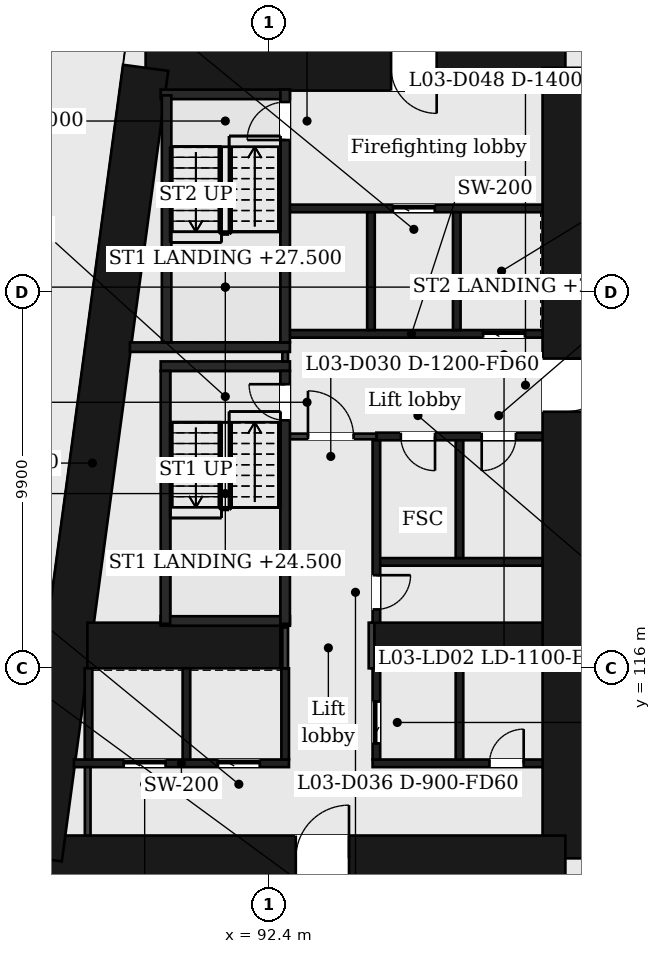
"""IFC4 building model, lengths in metres.
Left out: names, types, materials, properties, quantities, classifications, styles, units other than length and angle.
Written with IfcOpenShell. Run it as: python <this file> out.ifc"""

import sys

from ifc_helpers import new_model, si_unit, direction, frame, frame_2d, origin, place, context, subcontext, project, spatial, rectangle, extrude, element, fill, save


model = new_model("IFC4")
c1 = context("Model", 3, precision=1e-05, world=origin(), true_north=direction((0.0, 1.0)))
c2 = subcontext(c1, "Body", "Model", "MODEL_VIEW")
j1 = project(units=[si_unit("LENGTHUNIT", "METRE"), si_unit("PLANEANGLEUNIT", "RADIAN")], contexts=[c1])
p1 = place(None, origin())
s1 = spatial("IfcSite", under=j1, at=p1, CompositionType="ELEMENT")
p2 = place(p1, origin())
s2 = spatial("IfcBuilding", under=s1, at=p2, CompositionType="ELEMENT")
p3 = place(p2, frame((0.0, 0.0, 23.0)))
s3 = spatial("IfcBuildingStorey", under=s2, at=p3, CompositionType="ELEMENT", Elevation=23.0)
p4 = place(p3, frame((89.156, 131.8, 0.0), z_axis=(0.0, 0.0, 1.0), x_axis=(1.0, 0.0, 0.0)))
e1 = element("IfcWall", 1, at=p4, inside=s3, PredefinedType="SHEAR", context=c2, shape_type="SweptSolid", body=[
    extrude(rectangle(XDim=11.044, YDim=1.2, at=frame_2d((5.522, 0.0))), origin(), (0.0, 0.0, 1.0), 6.0),
])
p5 = place(p4, frame((6.458, 0.0, 0.0)))
e2 = element("IfcOpeningElement", 2, at=p5, cuts=e1, PredefinedType="OPENING", context=c2, shape_type="SweptSolid", body=[
    extrude(rectangle(XDim=1.2, YDim=2.1, at=frame_2d((0.6, 1.05))), frame((0.0, 0.61, 0.0), z_axis=(0.0, -1.0, 0.0), x_axis=(1.0, 0.0, 0.0)), (0.0, 0.0, 1.0), 1.22),
])
p6 = place(p3, frame((100.2, 131.8, 0.0), z_axis=(0.0, 0.0, 1.0), x_axis=(0.0, -1.0, 0.0)))
e3 = element("IfcWall", 3, at=p6, inside=s3, PredefinedType="SHEAR", context=c2, shape_type="SweptSolid", body=[
    extrude(rectangle(XDim=20.8, YDim=1.2, at=frame_2d((10.4, 0.0))), origin(), (0.0, 0.0, 1.0), 6.0),
])
p7 = place(p6, frame((7.65, 0.0, 0.0)))
e4 = element("IfcOpeningElement", 4, at=p7, cuts=e3, PredefinedType="OPENING", context=c2, shape_type="SweptSolid", body=[
    extrude(rectangle(XDim=1.4, YDim=2.1, at=frame_2d((0.7, 1.05))), frame((0.0, 0.61, 0.0), z_axis=(0.0, -1.0, 0.0), x_axis=(1.0, 0.0, 0.0)), (0.0, 0.0, 1.0), 1.22),
])
p8 = place(p3, frame((100.2, 111.0, 0.0), z_axis=(0.0, 0.0, 1.0), x_axis=(-1.0, 0.0, 0.0)))
e5 = element("IfcWall", 5, at=p8, inside=s3, PredefinedType="SHEAR", context=c2, shape_type="SweptSolid", body=[
    extrude(rectangle(XDim=13.844, YDim=1.2, at=frame_2d((6.922, 0.0))), origin(), (0.0, 0.0, 1.0), 6.0),
])
p9 = place(p8, frame((5.694, 0.0, 0.0)))
e6 = element("IfcOpeningElement", 6, at=p9, cuts=e5, PredefinedType="OPENING", context=c2, shape_type="SweptSolid", body=[
    extrude(rectangle(XDim=1.4, YDim=2.1, at=frame_2d((0.7, 1.05))), frame((0.0, 0.61, 0.0), z_axis=(0.0, -1.0, 0.0), x_axis=(1.0, 0.0, 0.0)), (0.0, 0.0, 1.0), 1.22),
])
p10 = place(p3, frame((86.355, 111.0, 0.0), z_axis=(0.0, 0.0, 1.0), x_axis=(0.133413989637, 0.99106039542, 0.0)))
e7 = element("IfcWall", 7, at=p10, inside=s3, PredefinedType="SHEAR", context=c2, shape_type="SweptSolid", body=[
    extrude(rectangle(XDim=20.988, YDim=1.2, at=frame_2d((10.494, 0.0))), origin(), (0.0, 0.0, 1.0), 6.0),
])
p11 = place(p3, frame((87.623, 116.6, 0.0), z_axis=(0.0, 0.0, 1.0), x_axis=(1.0, 0.0, 0.0)))
e8 = element("IfcWall", 8, at=p11, inside=s3, PredefinedType="SHEAR", context=c2, shape_type="SweptSolid", body=[
    extrude(rectangle(XDim=5.077, YDim=1.2, at=frame_2d((2.539, 0.0))), origin(), (0.0, 0.0, 1.0), 6.0),
])
p12 = place(p3, frame((95.1, 116.6, 0.0), z_axis=(0.0, 0.0, 1.0), x_axis=(1.0, 0.0, 0.0)))
e9 = element("IfcWall", 9, at=p12, inside=s3, PredefinedType="SHEAR", context=c2, shape_type="SweptSolid", body=[
    extrude(rectangle(XDim=4.5, YDim=1.2, at=frame_2d((2.25, 0.0))), origin(), (0.0, 0.0, 1.0), 6.0),
])
p13 = place(p3, frame((87.267, 113.5, 0.0), z_axis=(0.0, 0.0, 1.0), x_axis=(1.0, 0.0, 0.0)))
e10 = element("IfcWall", 10, at=p13, inside=s3, PredefinedType="PARTITIONING", context=c2, shape_type="SweptSolid", body=[
    extrude(rectangle(XDim=5.66, YDim=0.2, at=frame_2d((2.83, 0.0))), origin(), (0.0, 0.0, 1.0), 5.5),
])
p14 = place(p13, frame((1.312, 0.0, 0.0)))
e11 = element("IfcOpeningElement", 11, at=p14, cuts=e10, PredefinedType="OPENING", context=c2, shape_type="SweptSolid", body=[
    extrude(rectangle(XDim=1.1, YDim=2.1, at=frame_2d((0.55, 1.05))), frame((0.0, 0.11, 0.0), z_axis=(0.0, -1.0, 0.0), x_axis=(1.0, 0.0, 0.0)), (0.0, 0.0, 1.0), 0.22),
])
p15 = place(p13, frame((3.791, 0.0, 0.0)))
e12 = element("IfcOpeningElement", 12, at=p15, cuts=e10, PredefinedType="OPENING", context=c2, shape_type="SweptSolid", body=[
    extrude(rectangle(XDim=1.1, YDim=2.1, at=frame_2d((0.55, 1.05))), frame((0.0, 0.11, 0.0), z_axis=(0.0, -1.0, 0.0), x_axis=(1.0, 0.0, 0.0)), (0.0, 0.0, 1.0), 0.22),
])
p16 = place(p3, frame((95.127, 113.5, 0.0), z_axis=(0.0, 0.0, 1.0), x_axis=(1.0, 0.0, 0.0)))
e13 = element("IfcWall", 13, at=p16, inside=s3, PredefinedType="PARTITIONING", context=c2, shape_type="SweptSolid", body=[
    extrude(rectangle(XDim=4.473, YDim=0.2, at=frame_2d((2.237, 0.0))), origin(), (0.0, 0.0, 1.0), 5.5),
])
p17 = place(p16, frame((3.076, 0.0, 0.0)))
e14 = element("IfcOpeningElement", 14, at=p17, cuts=e13, PredefinedType="OPENING", context=c2, shape_type="SweptSolid", body=[
    extrude(rectangle(XDim=0.9, YDim=2.1, at=frame_2d((0.45, 1.05))), frame((0.0, 0.11, 0.0), z_axis=(0.0, -1.0, 0.0), x_axis=(1.0, 0.0, 0.0)), (0.0, 0.0, 1.0), 0.22),
])
p18 = place(p3, frame((89.552, 117.245, 0.0), z_axis=(0.0, 0.0, 1.0), x_axis=(1.0, 0.0, 0.0)))
e15 = element("IfcWall", 15, at=p18, inside=s3, PredefinedType="PARTITIONING", context=c2, shape_type="SweptSolid", body=[
    extrude(rectangle(XDim=3.4, YDim=0.25, at=frame_2d((1.7, 0.0))), origin(), (0.0, 0.0, 1.0), 5.5),
])
p19 = place(p3, frame((95.227, 118.8, 0.0), z_axis=(0.0, 0.0, 1.0), x_axis=(1.0, 0.0, 0.0)))
e16 = element("IfcWall", 16, at=p19, inside=s3, PredefinedType="PARTITIONING", context=c2, shape_type="SweptSolid", body=[
    extrude(rectangle(XDim=4.373, YDim=0.2, at=frame_2d((2.187, 0.0))), origin(), (0.0, 0.0, 1.0), 5.5),
])
p20 = place(p3, frame((95.227, 122.1, 0.0), z_axis=(0.0, 0.0, 1.0), x_axis=(1.0, 0.0, 0.0)))
e17 = element("IfcWall", 17, at=p20, inside=s3, PredefinedType="PARTITIONING", context=c2, shape_type="SweptSolid", body=[
    extrude(rectangle(XDim=4.373, YDim=0.2, at=frame_2d((2.187, 0.0))), origin(), (0.0, 0.0, 1.0), 5.5),
])
p21 = place(p20, frame((0.643, 0.0, 0.0)))
e18 = element("IfcOpeningElement", 18, at=p21, cuts=e17, PredefinedType="OPENING", context=c2, shape_type="SweptSolid", body=[
    extrude(rectangle(XDim=0.9, YDim=2.1, at=frame_2d((0.45, 1.05))), frame((0.0, 0.11, 0.0), z_axis=(0.0, -1.0, 0.0), x_axis=(1.0, 0.0, 0.0)), (0.0, 0.0, 1.0), 0.22),
])
p22 = place(p20, frame((2.771, 0.0, 0.0)))
e19 = element("IfcOpeningElement", 19, at=p22, cuts=e17, PredefinedType="OPENING", context=c2, shape_type="SweptSolid", body=[
    extrude(rectangle(XDim=0.9, YDim=2.1, at=frame_2d((0.45, 1.05))), frame((0.0, 0.11, 0.0), z_axis=(0.0, -1.0, 0.0), x_axis=(1.0, 0.0, 0.0)), (0.0, 0.0, 1.0), 0.22),
])
p23 = place(p3, frame((92.827, 122.1, 0.0), z_axis=(0.0, 0.0, 1.0), x_axis=(1.0, 0.0, 0.0)))
e20 = element("IfcWall", 20, at=p23, inside=s3, PredefinedType="PARTITIONING", context=c2, shape_type="SweptSolid", body=[
    extrude(rectangle(XDim=2.4, YDim=0.15, at=frame_2d((1.2, 0.0))), origin(), (0.0, 0.0, 1.0), 5.5),
])
p24 = place(p23, frame((0.6, 0.0, 0.0)))
e21 = element("IfcOpeningElement", 21, at=p24, cuts=e20, PredefinedType="OPENING", context=c2, shape_type="SweptSolid", body=[
    extrude(rectangle(XDim=1.2, YDim=2.1, at=frame_2d((0.6, 1.05))), frame((0.0, 0.085, 0.0), z_axis=(0.0, -1.0, 0.0), x_axis=(1.0, 0.0, 0.0)), (0.0, 0.0, 1.0), 0.17),
])
p25 = place(p3, frame((89.552, 123.95, 0.0), z_axis=(0.0, 0.0, 1.0), x_axis=(1.0, 0.0, 0.0)))
e22 = element("IfcWall", 22, at=p25, inside=s3, PredefinedType="PARTITIONING", context=c2, shape_type="SweptSolid", body=[
    extrude(rectangle(XDim=3.4, YDim=0.25, at=frame_2d((1.7, 0.0))), origin(), (0.0, 0.0, 1.0), 5.5),
])
p26 = place(p3, frame((88.741, 124.45, 0.0), z_axis=(0.0, 0.0, 1.0), x_axis=(1.0, 0.0, 0.0)))
e23 = element("IfcWall", 23, at=p26, inside=s3, PredefinedType="PARTITIONING", context=c2, shape_type="SweptSolid", body=[
    extrude(rectangle(XDim=4.21, YDim=0.25, at=frame_2d((2.105, 0.0))), origin(), (0.0, 0.0, 1.0), 5.5),
])
p27 = place(p3, frame((92.702, 124.8, 0.0), z_axis=(0.0, 0.0, 1.0), x_axis=(1.0, 0.0, 0.0)))
e24 = element("IfcWall", 24, at=p27, inside=s3, PredefinedType="PARTITIONING", context=c2, shape_type="SweptSolid", body=[
    extrude(rectangle(XDim=6.898, YDim=0.2, at=frame_2d((3.449, 0.0))), origin(), (0.0, 0.0, 1.0), 5.5),
])
p28 = place(p27, frame((5.334, 0.0, 0.0)))
e25 = element("IfcOpeningElement", 25, at=p28, cuts=e24, PredefinedType="OPENING", context=c2, shape_type="SweptSolid", body=[
    extrude(rectangle(XDim=1.1, YDim=2.1, at=frame_2d((0.55, 1.05))), frame((0.0, 0.11, 0.0), z_axis=(0.0, -1.0, 0.0), x_axis=(1.0, 0.0, 0.0)), (0.0, 0.0, 1.0), 0.22),
])
p29 = place(p3, frame((92.827, 128.1, 0.0), z_axis=(0.0, 0.0, 1.0), x_axis=(1.0, 0.0, 0.0)))
e26 = element("IfcWall", 26, at=p29, inside=s3, PredefinedType="PARTITIONING", context=c2, shape_type="SweptSolid", body=[
    extrude(rectangle(XDim=6.773, YDim=0.2, at=frame_2d((3.387, 0.0))), origin(), (0.0, 0.0, 1.0), 5.5),
])
p30 = place(p29, frame((2.836, 0.0, 0.0)))
e27 = element("IfcOpeningElement", 27, at=p30, cuts=e26, PredefinedType="OPENING", context=c2, shape_type="SweptSolid", body=[
    extrude(rectangle(XDim=1.1, YDim=2.1, at=frame_2d((0.55, 1.05))), frame((0.0, 0.11, 0.0), z_axis=(0.0, -1.0, 0.0), x_axis=(1.0, 0.0, 0.0)), (0.0, 0.0, 1.0), 0.22),
])
p31 = place(p3, frame((89.552, 131.101, 0.0), z_axis=(0.0, 0.0, 1.0), x_axis=(1.0, 0.0, 0.0)))
e28 = element("IfcWall", 28, at=p31, inside=s3, PredefinedType="PARTITIONING", context=c2, shape_type="SweptSolid", body=[
    extrude(rectangle(XDim=3.4, YDim=0.25, at=frame_2d((1.7, 0.0))), origin(), (0.0, 0.0, 1.0), 5.5),
])
p32 = place(p3, frame((87.653, 113.6, 0.0), z_axis=(0.0, 0.0, 1.0), x_axis=(0.0, 1.0, 0.0)))
e29 = element("IfcWall", 29, at=p32, inside=s3, PredefinedType="PARTITIONING", context=c2, shape_type="SweptSolid", body=[
    extrude(rectangle(XDim=2.4, YDim=0.2, at=frame_2d((1.2, 0.0))), origin(), (0.0, 0.0, 1.0), 5.5),
])
p33 = place(p3, frame((87.631, 111.6, 0.0), z_axis=(0.0, 0.0, 1.0), x_axis=(0.0, 1.0, 0.0)))
e30 = element("IfcWall", 30, at=p33, inside=s3, PredefinedType="PARTITIONING", context=c2, shape_type="SweptSolid", body=[
    extrude(rectangle(XDim=1.8, YDim=0.15, at=frame_2d((0.9, 0.0))), origin(), (0.0, 0.0, 1.0), 5.5),
])
p34 = place(p3, frame((89.677, 117.17, 0.0), z_axis=(0.0, 0.0, 1.0), x_axis=(0.0, 1.0, 0.0)))
e31 = element("IfcWall", 31, at=p34, inside=s3, PredefinedType="PARTITIONING", context=c2, shape_type="SweptSolid", body=[
    extrude(rectangle(XDim=6.655, YDim=0.25, at=frame_2d((3.328, 0.0))), origin(), (0.0, 0.0, 1.0), 5.5),
])
p35 = place(p3, frame((89.707, 124.575, 0.0), z_axis=(0.0, 0.0, 1.0), x_axis=(0.0, 1.0, 0.0)))
e32 = element("IfcWall", 32, at=p35, inside=s3, PredefinedType="PARTITIONING", context=c2, shape_type="SweptSolid", body=[
    extrude(rectangle(XDim=6.5, YDim=0.25, at=frame_2d((3.25, 0.0))), origin(), (0.0, 0.0, 1.0), 5.5),
])
for number, where, z_axis, x_axis in (
    (33, (90.229, 113.6, 0.0), (0.0, 0.0, 1.0), (0.0, 1.0, 0.0)),
    (34, (92.827, 113.6, 0.0), (0.0, 0.0, 1.0), (0.0, 1.0, 0.0)),
):
    element("IfcWall", number, at=place(p3, frame(where, z_axis=z_axis, x_axis=x_axis)), inside=s3, PredefinedType="PARTITIONING", context=c2, shape_type="SweptSolid", body=[
        extrude(rectangle(XDim=2.4, YDim=0.2, at=frame_2d((1.2, 0.0))), origin(), (0.0, 0.0, 1.0), 5.5),
    ])
p36 = place(p3, frame((92.827, 116.0, 0.0), z_axis=(0.0, 0.0, 1.0), x_axis=(0.0, 1.0, 0.0)))
e35 = element("IfcWall", 35, at=p36, inside=s3, PredefinedType="PARTITIONING", context=c2, shape_type="SweptSolid", body=[
    extrude(rectangle(XDim=1.075, YDim=0.15, at=frame_2d((0.538, 0.0))), origin(), (0.0, 0.0, 1.0), 5.5),
])
p37 = place(p3, frame((92.827, 124.075, 0.0), z_axis=(0.0, 0.0, 1.0), x_axis=(0.0, 1.0, 0.0)))
e36 = element("IfcWall", 36, at=p37, inside=s3, PredefinedType="PARTITIONING", context=c2, shape_type="SweptSolid", body=[
    extrude(rectangle(XDim=0.25, YDim=0.15, at=frame_2d((0.125, 0.0))), origin(), (0.0, 0.0, 1.0), 5.5),
])
p38 = place(p3, frame((92.827, 117.17, 0.0), z_axis=(0.0, 0.0, 1.0), x_axis=(0.0, 1.0, 0.0)))
e37 = element("IfcWall", 37, at=p38, inside=s3, PredefinedType="PARTITIONING", context=c2, shape_type="SweptSolid", body=[
    extrude(rectangle(XDim=6.655, YDim=0.25, at=frame_2d((3.328, 0.0))), origin(), (0.0, 0.0, 1.0), 5.5),
])
p39 = place(p38, frame((5.355, 0.0, 0.0)))
e38 = element("IfcOpeningElement", 38, at=p39, cuts=e37, PredefinedType="OPENING", context=c2, shape_type="SweptSolid", body=[
    extrude(rectangle(XDim=0.95, YDim=2.1, at=frame_2d((0.475, 1.05))), frame((0.0, 0.135, 0.0), z_axis=(0.0, -1.0, 0.0), x_axis=(1.0, 0.0, 0.0)), (0.0, 0.0, 1.0), 0.27),
])
p40 = place(p3, frame((92.827, 124.575, 0.0), z_axis=(0.0, 0.0, 1.0), x_axis=(0.0, 1.0, 0.0)))
e39 = element("IfcWall", 39, at=p40, inside=s3, PredefinedType="PARTITIONING", context=c2, shape_type="SweptSolid", body=[
    extrude(rectangle(XDim=6.655, YDim=0.25, at=frame_2d((3.328, 0.0))), origin(), (0.0, 0.0, 1.0), 5.5),
])
p41 = place(p40, frame((5.325, 0.0, 0.0)))
e40 = element("IfcOpeningElement", 40, at=p41, cuts=e39, PredefinedType="OPENING", context=c2, shape_type="SweptSolid", body=[
    extrude(rectangle(XDim=1.0, YDim=2.1, at=frame_2d((0.5, 1.05))), frame((0.0, 0.135, 0.0), z_axis=(0.0, -1.0, 0.0), x_axis=(1.0, 0.0, 0.0)), (0.0, 0.0, 1.0), 0.27),
])
p42 = place(p3, frame((95.085, 124.9, 0.0), z_axis=(0.0, 0.0, 1.0), x_axis=(0.0, 1.0, 0.0)))
e41 = element("IfcWall", 41, at=p42, inside=s3, PredefinedType="PARTITIONING", context=c2, shape_type="SweptSolid", body=[
    extrude(rectangle(XDim=3.1, YDim=0.2, at=frame_2d((1.55, 0.0))), origin(), (0.0, 0.0, 1.0), 5.5),
])
p43 = place(p3, frame((95.1, 116.0, 0.0), z_axis=(0.0, 0.0, 1.0), x_axis=(0.0, 1.0, 0.0)))
e42 = element("IfcWall", 42, at=p43, inside=s3, PredefinedType="PARTITIONING", context=c2, shape_type="SweptSolid", body=[
    extrude(rectangle(XDim=1.2, YDim=0.15, at=frame_2d((0.6, 0.0))), origin(), (0.0, 0.0, 1.0), 5.5),
])
p44 = place(p3, frame((95.227, 113.6, 0.0), z_axis=(0.0, 0.0, 1.0), x_axis=(0.0, 1.0, 0.0)))
e43 = element("IfcWall", 43, at=p44, inside=s3, PredefinedType="PARTITIONING", context=c2, shape_type="SweptSolid", body=[
    extrude(rectangle(XDim=2.4, YDim=0.2, at=frame_2d((1.2, 0.0))), origin(), (0.0, 0.0, 1.0), 5.5),
])
p45 = place(p44, frame((0.425, 0.0, 0.0)))
e44 = element("IfcOpeningElement", 44, at=p45, cuts=e43, PredefinedType="OPENING", context=c2, shape_type="SweptSolid", body=[
    extrude(rectangle(XDim=1.1, YDim=2.1, at=frame_2d((0.55, 1.05))), frame((0.0, 0.11, 0.0), z_axis=(0.0, -1.0, 0.0), x_axis=(1.0, 0.0, 0.0)), (0.0, 0.0, 1.0), 0.22),
])
p46 = place(p3, frame((95.227, 117.2, 0.0), z_axis=(0.0, 0.0, 1.0), x_axis=(0.0, 1.0, 0.0)))
e45 = element("IfcWall", 45, at=p46, inside=s3, PredefinedType="PARTITIONING", context=c2, shape_type="SweptSolid", body=[
    extrude(rectangle(XDim=4.8, YDim=0.2, at=frame_2d((2.4, 0.0))), origin(), (0.0, 0.0, 1.0), 5.5),
])
p47 = place(p46, frame((0.35, 0.0, 0.0)))
e46 = element("IfcOpeningElement", 46, at=p47, cuts=e45, PredefinedType="OPENING", context=c2, shape_type="SweptSolid", body=[
    extrude(rectangle(XDim=0.9, YDim=2.1, at=frame_2d((0.45, 1.05))), frame((0.0, 0.11, 0.0), z_axis=(0.0, -1.0, 0.0), x_axis=(1.0, 0.0, 0.0)), (0.0, 0.0, 1.0), 0.22),
])
p48 = place(p3, frame((97.342, 124.9, 0.0), z_axis=(0.0, 0.0, 1.0), x_axis=(0.0, 1.0, 0.0)))
e47 = element("IfcWall", 47, at=p48, inside=s3, PredefinedType="PARTITIONING", context=c2, shape_type="SweptSolid", body=[
    extrude(rectangle(XDim=3.1, YDim=0.2, at=frame_2d((1.55, 0.0))), origin(), (0.0, 0.0, 1.0), 5.5),
])
p49 = place(p3, frame((97.414, 113.6, 0.0), z_axis=(0.0, 0.0, 1.0), x_axis=(0.0, 1.0, 0.0)))
e48 = element("IfcWall", 48, at=p49, inside=s3, PredefinedType="PARTITIONING", context=c2, shape_type="SweptSolid", body=[
    extrude(rectangle(XDim=2.4, YDim=0.2, at=frame_2d((1.2, 0.0))), origin(), (0.0, 0.0, 1.0), 5.5),
])
p50 = place(p3, frame((97.414, 118.9, 0.0), z_axis=(0.0, 0.0, 1.0), x_axis=(0.0, 1.0, 0.0)))
e49 = element("IfcWall", 49, at=p50, inside=s3, PredefinedType="PARTITIONING", context=c2, shape_type="SweptSolid", body=[
    extrude(rectangle(XDim=3.1, YDim=0.2, at=frame_2d((1.55, 0.0))), origin(), (0.0, 0.0, 1.0), 5.5),
])
p51 = place(p24, origin())
e50 = element("IfcDoor", 50, at=p51, inside=s3, OperationType="SINGLE_SWING_LEFT", PredefinedType="DOOR", context=c2, shape_type="SweptSolid", body=[
    extrude(rectangle(XDim=1.2, YDim=2.1, at=frame_2d((0.6, 1.05))), frame((0.0, 0.025, 0.0), z_axis=(0.0, -1.0, 0.0), x_axis=(1.0, 0.0, 0.0)), (0.0, 0.0, 1.0), 0.05),
])
fill(e21, e50)
p52 = place(p30, origin())
e51 = element("IfcDoor", 51, at=p52, inside=s3, OperationType="SLIDING_TO_LEFT", PredefinedType="DOOR", context=c2, shape_type="SweptSolid", body=[
    extrude(rectangle(XDim=1.1, YDim=2.1, at=frame_2d((0.55, 1.05))), frame((0.0, 0.025, 0.0), z_axis=(0.0, -1.0, 0.0), x_axis=(1.0, 0.0, 0.0)), (0.0, 0.0, 1.0), 0.05),
])
fill(e27, e51)
p53 = place(p28, origin())
e52 = element("IfcDoor", 52, at=p53, inside=s3, OperationType="SLIDING_TO_LEFT", PredefinedType="DOOR", context=c2, shape_type="SweptSolid", body=[
    extrude(rectangle(XDim=1.1, YDim=2.1, at=frame_2d((0.55, 1.05))), frame((0.0, 0.025, 0.0), z_axis=(0.0, -1.0, 0.0), x_axis=(1.0, 0.0, 0.0)), (0.0, 0.0, 1.0), 0.05),
])
fill(e25, e52)
p54 = place(p21, origin())
e53 = element("IfcDoor", 53, at=p54, inside=s3, OperationType="SINGLE_SWING_RIGHT", PredefinedType="DOOR", context=c2, shape_type="SweptSolid", body=[
    extrude(rectangle(XDim=0.9, YDim=2.1, at=frame_2d((0.45, 1.05))), frame((0.0, 0.025, 0.0), z_axis=(0.0, -1.0, 0.0), x_axis=(1.0, 0.0, 0.0)), (0.0, 0.0, 1.0), 0.05),
])
fill(e18, e53)
p55 = place(p22, origin())
e54 = element("IfcDoor", 54, at=p55, inside=s3, OperationType="SINGLE_SWING_LEFT", PredefinedType="DOOR", context=c2, shape_type="SweptSolid", body=[
    extrude(rectangle(XDim=0.9, YDim=2.1, at=frame_2d((0.45, 1.05))), frame((0.0, 0.025, 0.0), z_axis=(0.0, -1.0, 0.0), x_axis=(1.0, 0.0, 0.0)), (0.0, 0.0, 1.0), 0.05),
])
fill(e19, e54)
p56 = place(p39, origin())
e55 = element("IfcDoor", 55, at=p56, inside=s3, OperationType="SINGLE_SWING_RIGHT", PredefinedType="DOOR", context=c2, shape_type="SweptSolid", body=[
    extrude(rectangle(XDim=0.95, YDim=2.1, at=frame_2d((0.475, 1.05))), frame((0.0, 0.025, 0.0), z_axis=(0.0, -1.0, 0.0), x_axis=(1.0, 0.0, 0.0)), (0.0, 0.0, 1.0), 0.05),
])
fill(e38, e55)
p57 = place(p41, origin())
e56 = element("IfcDoor", 56, at=p57, inside=s3, OperationType="SINGLE_SWING_LEFT", PredefinedType="DOOR", context=c2, shape_type="SweptSolid", body=[
    extrude(rectangle(XDim=1.0, YDim=2.1, at=frame_2d((0.5, 1.05))), frame((0.0, 0.025, 0.0), z_axis=(0.0, -1.0, 0.0), x_axis=(1.0, 0.0, 0.0)), (0.0, 0.0, 1.0), 0.05),
])
fill(e40, e56)
p58 = place(p47, origin())
e57 = element("IfcDoor", 57, at=p58, inside=s3, OperationType="SINGLE_SWING_RIGHT", PredefinedType="DOOR", context=c2, shape_type="SweptSolid", body=[
    extrude(rectangle(XDim=0.9, YDim=2.1, at=frame_2d((0.45, 1.05))), frame((0.0, 0.025, 0.0), z_axis=(0.0, -1.0, 0.0), x_axis=(1.0, 0.0, 0.0)), (0.0, 0.0, 1.0), 0.05),
])
fill(e46, e57)
p59 = place(p14, origin())
e58 = element("IfcDoor", 58, at=p59, inside=s3, OperationType="SLIDING_TO_LEFT", PredefinedType="DOOR", context=c2, shape_type="SweptSolid", body=[
    extrude(rectangle(XDim=1.1, YDim=2.1, at=frame_2d((0.55, 1.05))), frame((0.0, 0.025, 0.0), z_axis=(0.0, -1.0, 0.0), x_axis=(1.0, 0.0, 0.0)), (0.0, 0.0, 1.0), 0.05),
])
fill(e11, e58)
p60 = place(p15, origin())
e59 = element("IfcDoor", 59, at=p60, inside=s3, OperationType="SLIDING_TO_LEFT", PredefinedType="DOOR", context=c2, shape_type="SweptSolid", body=[
    extrude(rectangle(XDim=1.1, YDim=2.1, at=frame_2d((0.55, 1.05))), frame((0.0, 0.025, 0.0), z_axis=(0.0, -1.0, 0.0), x_axis=(1.0, 0.0, 0.0)), (0.0, 0.0, 1.0), 0.05),
])
fill(e12, e59)
p61 = place(p45, origin())
e60 = element("IfcDoor", 60, at=p61, inside=s3, OperationType="SLIDING_TO_LEFT", PredefinedType="DOOR", context=c2, shape_type="SweptSolid", body=[
    extrude(rectangle(XDim=1.1, YDim=2.1, at=frame_2d((0.55, 1.05))), frame((0.0, 0.025, 0.0), z_axis=(0.0, -1.0, 0.0), x_axis=(1.0, 0.0, 0.0)), (0.0, 0.0, 1.0), 0.05),
])
fill(e44, e60)
p62 = place(p17, origin())
e61 = element("IfcDoor", 61, at=p62, inside=s3, OperationType="SINGLE_SWING_RIGHT", PredefinedType="DOOR", context=c2, shape_type="SweptSolid", body=[
    extrude(rectangle(XDim=0.9, YDim=2.1, at=frame_2d((0.45, 1.05))), frame((0.0, 0.025, 0.0), z_axis=(0.0, -1.0, 0.0), x_axis=(1.0, 0.0, 0.0)), (0.0, 0.0, 1.0), 0.05),
])
fill(e14, e61)
p63 = place(p9, origin())
e62 = element("IfcDoor", 62, at=p63, inside=s3, OperationType="SINGLE_SWING_LEFT", PredefinedType="DOOR", context=c2, shape_type="SweptSolid", body=[
    extrude(rectangle(XDim=1.4, YDim=2.1, at=frame_2d((0.7, 1.05))), frame((0.0, 0.025, 0.0), z_axis=(0.0, -1.0, 0.0), x_axis=(1.0, 0.0, 0.0)), (0.0, 0.0, 1.0), 0.05),
])
fill(e6, e62)
p64 = place(p5, origin())
e63 = element("IfcDoor", 63, at=p64, inside=s3, OperationType="SINGLE_SWING_RIGHT", PredefinedType="DOOR", context=c2, shape_type="SweptSolid", body=[
    extrude(rectangle(XDim=1.2, YDim=2.1, at=frame_2d((0.6, 1.05))), frame((0.0, 0.025, 0.0), z_axis=(0.0, -1.0, 0.0), x_axis=(1.0, 0.0, 0.0)), (0.0, 0.0, 1.0), 0.05),
])
fill(e2, e63)
p65 = place(p7, origin())
e64 = element("IfcDoor", 64, at=p65, inside=s3, OperationType="SINGLE_SWING_LEFT", PredefinedType="DOOR", context=c2, shape_type="SweptSolid", body=[
    extrude(rectangle(XDim=1.4, YDim=2.1, at=frame_2d((0.7, 1.05))), frame((0.0, 0.025, 0.0), z_axis=(0.0, -1.0, 0.0), x_axis=(1.0, 0.0, 0.0)), (0.0, 0.0, 1.0), 0.05),
])
fill(e4, e64)
save(model, sys.argv[1])
